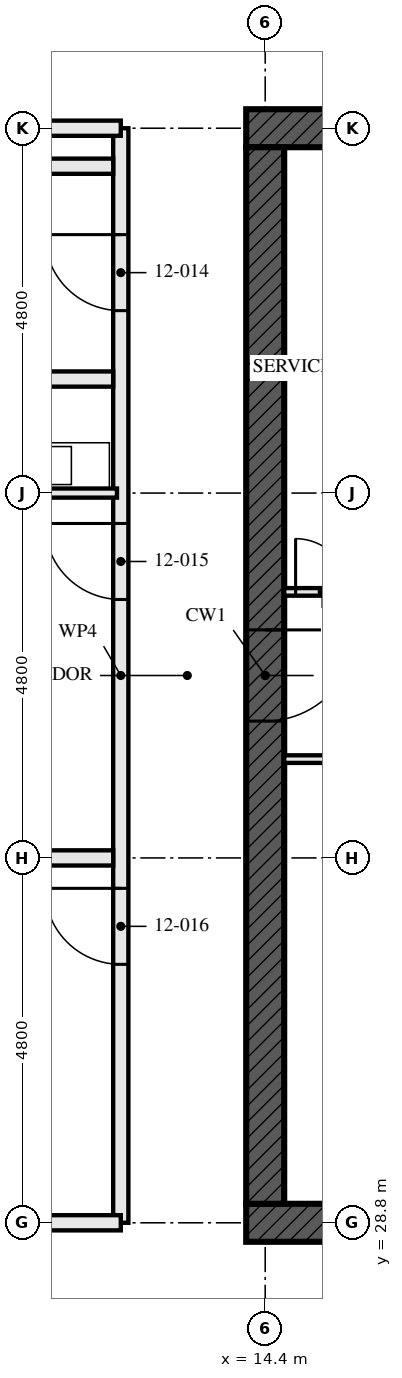
"""IFC4 building model, lengths in metres.
Left out: names, types, materials, properties, quantities, classifications, styles, units other than length and angle.
Written with IfcOpenShell. Run it as: python <this file> out.ifc"""

import sys

from ifc_helpers import new_model, si_unit, direction, frame, frame_2d, origin, place, context, subcontext, project, spatial, rectangle, extrude, element, fill, save


model = new_model("IFC4")
c1 = context("Model", 3, precision=1e-05, world=origin(), true_north=direction((0.0, 1.0)))
c2 = subcontext(c1, "Body", "Model", "MODEL_VIEW")
j1 = project(units=[si_unit("LENGTHUNIT", "METRE"), si_unit("PLANEANGLEUNIT", "RADIAN")], contexts=[c1])
p1 = place(None, origin())
s1 = spatial("IfcSite", under=j1, at=p1, CompositionType="ELEMENT")
p2 = place(p1, origin())
s2 = spatial("IfcBuilding", under=s1, at=p2, CompositionType="ELEMENT")
p3 = place(p2, frame((0.0, 0.0, 48.0)))
s3 = spatial("IfcBuildingStorey", under=s2, at=p3, CompositionType="ELEMENT", Elevation=48.0)
p4 = place(p3, frame((14.15, 28.8, -0.17), z_axis=(0.0, 0.0, 1.0), x_axis=(1.0, 0.0, 0.0)))
e1 = element("IfcWall", 1, at=p4, inside=s3, PredefinedType="SHEAR", context=c2, shape_type="SweptSolid", body=[
    extrude(rectangle(XDim=14.9, YDim=0.5, at=frame_2d((7.45, 0.0))), origin(), (0.0, 0.0, 1.0), 3.5),
])
p5 = place(p4, frame((6.85, 0.0, 0.17)))
e2 = element("IfcOpeningElement", 2, at=p5, cuts=e1, PredefinedType="OPENING", context=c2, shape_type="SweptSolid", body=[
    extrude(rectangle(XDim=1.2, YDim=2.1, at=frame_2d((0.6, 1.05))), frame((0.0, 0.26, 0.0), z_axis=(0.0, -1.0, 0.0), x_axis=(1.0, 0.0, 0.0)), (0.0, 0.0, 1.0), 0.521),
])
p6 = place(p3, frame((29.05, 43.2, -0.17), z_axis=(0.0, 0.0, 1.0), x_axis=(-1.0, 0.0, 0.0)))
e3 = element("IfcWall", 3, at=p6, inside=s3, PredefinedType="SHEAR", context=c2, shape_type="SweptSolid", body=[
    extrude(rectangle(XDim=14.9, YDim=0.5, at=frame_2d((7.45, 0.0))), origin(), (0.0, 0.0, 1.0), 3.5),
])
p7 = place(p6, frame((6.85, 0.0, 0.17)))
e4 = element("IfcOpeningElement", 4, at=p7, cuts=e3, PredefinedType="OPENING", context=c2, shape_type="SweptSolid", body=[
    extrude(rectangle(XDim=1.2, YDim=2.1, at=frame_2d((0.6, 1.05))), frame((0.0, 0.26, 0.0), z_axis=(0.0, -1.0, 0.0), x_axis=(1.0, 0.0, 0.0)), (0.0, 0.0, 1.0), 0.521),
])
p8 = place(p3, frame((14.4, 42.95, -0.17), z_axis=(0.0, 0.0, 1.0), x_axis=(0.0, -1.0, 0.0)))
e5 = element("IfcWall", 5, at=p8, inside=s3, PredefinedType="SHEAR", context=c2, shape_type="SweptSolid", body=[
    extrude(rectangle(XDim=13.9, YDim=0.5, at=frame_2d((6.95, 0.0))), origin(), (0.0, 0.0, 1.0), 3.5),
])
p9 = place(p8, frame((6.35, 0.0, 0.17)))
e6 = element("IfcOpeningElement", 6, at=p9, cuts=e5, PredefinedType="OPENING", context=c2, shape_type="SweptSolid", body=[
    extrude(rectangle(XDim=1.2, YDim=2.1, at=frame_2d((0.6, 1.05))), frame((0.0, 0.26, 0.0), z_axis=(0.0, -1.0, 0.0), x_axis=(1.0, 0.0, 0.0)), (0.0, 0.0, 1.0), 0.521),
])
for number, where, z_axis, x_axis in (
    (7, (7.7, 42.7, 0.0), (0.0, 0.0, 1.0), (1.0, 0.0, 0.0)),
    (8, (7.7, 39.9, 0.0), (0.0, 0.0, 1.0), (1.0, 0.0, 0.0)),
):
    element("IfcWall", number, at=place(p3, frame(where, z_axis=z_axis, x_axis=x_axis)), inside=s3, PredefinedType="SOLIDWALL", context=c2, shape_type="SweptSolid", body=[
        extrude(rectangle(XDim=4.7, YDim=0.2, at=frame_2d((2.35, 0.0))), origin(), (0.0, 0.0, 1.0), 2.99),
    ])
p10 = place(p3, frame((6.2, 38.4, 0.0), z_axis=(0.0, 0.0, 1.0), x_axis=(1.0, 0.0, 0.0)))
e9 = element("IfcWall", 9, at=p10, inside=s3, PredefinedType="PARTITIONING", context=c2, shape_type="SweptSolid", body=[
    extrude(rectangle(XDim=6.25, YDim=0.12, at=frame_2d((3.125, 0.0))), origin(), (0.0, 0.0, 1.0), 2.55),
])
p11 = place(p10, frame((3.15, 0.0, 0.0)))
e10 = element("IfcOpeningElement", 10, at=p11, cuts=e9, PredefinedType="OPENING", context=c2, shape_type="SweptSolid", body=[
    extrude(rectangle(XDim=0.9, YDim=2.1, at=frame_2d((0.45, 1.05))), frame((0.0, 0.071, 0.0), z_axis=(0.0, -1.0, 0.0), x_axis=(1.0, 0.0, 0.0)), (0.0, 0.0, 1.0), 0.141),
])
p12 = place(p3, frame((0.395, 33.6, 0.0), z_axis=(0.0, 0.0, 1.0), x_axis=(1.0, 0.0, 0.0)))
e11 = element("IfcWall", 11, at=p12, inside=s3, PredefinedType="PARTITIONING", context=c2, shape_type="SweptSolid", body=[
    extrude(rectangle(XDim=12.005, YDim=0.2, at=frame_2d((6.002, 0.0))), origin(), (0.0, 0.0, 1.0), 2.55),
])
p13 = place(p3, frame((12.5, 43.2, 0.0), z_axis=(0.0, 0.0, 1.0), x_axis=(0.0, -1.0, 0.0)))
e12 = element("IfcWall", 12, at=p13, inside=s3, PredefinedType="PARTITIONING", context=c2, shape_type="SweptSolid", body=[
    extrude(rectangle(XDim=14.4, YDim=0.2, at=frame_2d((7.2, 0.0))), origin(), (0.0, 0.0, 1.0), 2.55),
])
p14 = place(p13, frame((1.4, 0.0, 0.0)))
e13 = element("IfcOpeningElement", 13, at=p14, cuts=e12, PredefinedType="OPENING", context=c2, shape_type="SweptSolid", body=[
    extrude(rectangle(XDim=1.0, YDim=2.1, at=frame_2d((0.5, 1.05))), frame((0.0, 0.111, 0.0), z_axis=(0.0, -1.0, 0.0), x_axis=(1.0, 0.0, 0.0)), (0.0, 0.0, 1.0), 0.221),
])
p15 = place(p13, frame((5.2, 0.0, 0.0)))
e14 = element("IfcOpeningElement", 14, at=p15, cuts=e12, PredefinedType="OPENING", context=c2, shape_type="SweptSolid", body=[
    extrude(rectangle(XDim=1.0, YDim=2.1, at=frame_2d((0.5, 1.05))), frame((0.0, 0.111, 0.0), z_axis=(0.0, -1.0, 0.0), x_axis=(1.0, 0.0, 0.0)), (0.0, 0.0, 1.0), 0.221),
])
p16 = place(p13, frame((10.0, 0.0, 0.0)))
e15 = element("IfcOpeningElement", 15, at=p16, cuts=e12, PredefinedType="OPENING", context=c2, shape_type="SweptSolid", body=[
    extrude(rectangle(XDim=1.0, YDim=2.1, at=frame_2d((0.5, 1.05))), frame((0.0, 0.111, 0.0), z_axis=(0.0, -1.0, 0.0), x_axis=(1.0, 0.0, 0.0)), (0.0, 0.0, 1.0), 0.221),
])
p17 = place(p3, frame((14.65, 34.9, 0.0), z_axis=(0.0, 0.0, 1.0), x_axis=(1.0, 0.0, 0.0)))
e16 = element("IfcWall", 16, at=p17, inside=s3, PredefinedType="SOLIDWALL", context=c2, shape_type="SweptSolid", body=[
    extrude(rectangle(XDim=5.9, YDim=0.1, at=frame_2d((2.95, 0.0))), origin(), (0.0, 0.0, 1.0), 3.33),
])
p18 = place(p17, frame((1.6, 0.0, 0.0)))
e17 = element("IfcOpeningElement", 17, at=p18, cuts=e16, PredefinedType="OPENING", context=c2, shape_type="SweptSolid", body=[
    extrude(rectangle(XDim=0.7, YDim=2.1, at=frame_2d((0.35, 1.05))), frame((0.0, 0.061, 0.0), z_axis=(0.0, -1.0, 0.0), x_axis=(1.0, 0.0, 0.0)), (0.0, 0.0, 1.0), 0.121),
])
p19 = place(p3, frame((14.65, 37.1, 0.0), z_axis=(0.0, 0.0, 1.0), x_axis=(1.0, 0.0, 0.0)))
e18 = element("IfcWall", 18, at=p19, inside=s3, PredefinedType="SOLIDWALL", context=c2, shape_type="SweptSolid", body=[
    extrude(rectangle(XDim=5.9, YDim=0.1, at=frame_2d((2.95, 0.0))), origin(), (0.0, 0.0, 1.0), 3.33),
])
p20 = place(p19, frame((0.15, 0.0, 0.0)))
e19 = element("IfcOpeningElement", 19, at=p20, cuts=e18, PredefinedType="OPENING", context=c2, shape_type="SweptSolid", body=[
    extrude(rectangle(XDim=0.7, YDim=2.1, at=frame_2d((0.35, 1.05))), frame((0.0, 0.061, 0.0), z_axis=(0.0, -1.0, 0.0), x_axis=(1.0, 0.0, 0.0)), (0.0, 0.0, 1.0), 0.121),
])
p21 = place(p19, frame((1.5, 0.0, 0.0)))
e20 = element("IfcOpeningElement", 20, at=p21, cuts=e18, PredefinedType="OPENING", context=c2, shape_type="SweptSolid", body=[
    extrude(rectangle(XDim=0.9, YDim=2.1, at=frame_2d((0.45, 1.05))), frame((0.0, 0.061, 0.0), z_axis=(0.0, -1.0, 0.0), x_axis=(1.0, 0.0, 0.0)), (0.0, 0.0, 1.0), 0.121),
])
for number, where, z_axis, x_axis in (
    (21, (12.5, 28.8, 0.0), (0.0, 0.0, 1.0), (-1.0, 0.0, 0.0)),
    (22, (12.5, 43.2, 0.0), (0.0, 0.0, 1.0), (-1.0, 0.0, 0.0)),
):
    element("IfcWall", number, at=place(p3, frame(where, z_axis=z_axis, x_axis=x_axis)), inside=s3, PredefinedType="PARTITIONING", context=c2, shape_type="SweptSolid", body=[
        extrude(rectangle(XDim=2.505, YDim=0.2, at=frame_2d((1.252, 0.0))), origin(), (0.0, 0.0, 1.0), 2.32),
    ])
p22 = place(p14, frame((1.0, 0.0, 0.0), z_axis=(0.0, 0.0, 1.0), x_axis=(-1.0, 0.0, 0.0)))
e23 = element("IfcDoor", 23, at=p22, inside=s3, OperationType="SINGLE_SWING_LEFT", PredefinedType="DOOR", context=c2, shape_type="SweptSolid", body=[
    extrude(rectangle(XDim=1.0, YDim=2.1, at=frame_2d((0.5, 1.05))), frame((0.0, 0.032, 0.0), z_axis=(0.0, -1.0, 0.0), x_axis=(1.0, 0.0, 0.0)), (0.0, 0.0, 1.0), 0.064),
])
fill(e13, e23)
p23 = place(p15, frame((1.0, 0.0, 0.0), z_axis=(0.0, 0.0, 1.0), x_axis=(-1.0, 0.0, 0.0)))
e24 = element("IfcDoor", 24, at=p23, inside=s3, OperationType="SINGLE_SWING_LEFT", PredefinedType="DOOR", context=c2, shape_type="SweptSolid", body=[
    extrude(rectangle(XDim=1.0, YDim=2.1, at=frame_2d((0.5, 1.05))), frame((0.0, 0.027, 0.0), z_axis=(0.0, -1.0, 0.0), x_axis=(1.0, 0.0, 0.0)), (0.0, 0.0, 1.0), 0.054),
])
fill(e14, e24)
p24 = place(p16, frame((1.0, 0.0, 0.0), z_axis=(0.0, 0.0, 1.0), x_axis=(-1.0, 0.0, 0.0)))
e25 = element("IfcDoor", 25, at=p24, inside=s3, OperationType="SINGLE_SWING_LEFT", PredefinedType="DOOR", context=c2, shape_type="SweptSolid", body=[
    extrude(rectangle(XDim=1.0, YDim=2.1, at=frame_2d((0.5, 1.05))), frame((0.0, 0.027, 0.0), z_axis=(0.0, -1.0, 0.0), x_axis=(1.0, 0.0, 0.0)), (0.0, 0.0, 1.0), 0.054),
])
fill(e15, e25)
p25 = place(p20, origin())
e26 = element("IfcDoor", 26, at=p25, inside=s3, OperationType="SINGLE_SWING_RIGHT", PredefinedType="DOOR", context=c2, shape_type="SweptSolid", body=[
    extrude(rectangle(XDim=0.7, YDim=2.1, at=frame_2d((0.35, 1.05))), frame((0.0, 0.027, 0.0), z_axis=(0.0, -1.0, 0.0), x_axis=(1.0, 0.0, 0.0)), (0.0, 0.0, 1.0), 0.054),
])
fill(e19, e26)
p26 = place(p9, origin())
e27 = element("IfcDoor", 27, at=p26, inside=s3, OperationType="SINGLE_SWING_LEFT", PredefinedType="DOOR", context=c2, shape_type="SweptSolid", body=[
    extrude(rectangle(XDim=1.2, YDim=2.1, at=frame_2d((0.6, 1.05))), frame((0.0, 0.027, 0.0), z_axis=(0.0, -1.0, 0.0), x_axis=(1.0, 0.0, 0.0)), (0.0, 0.0, 1.0), 0.054),
])
fill(e6, e27)
save(model, sys.argv[1])
